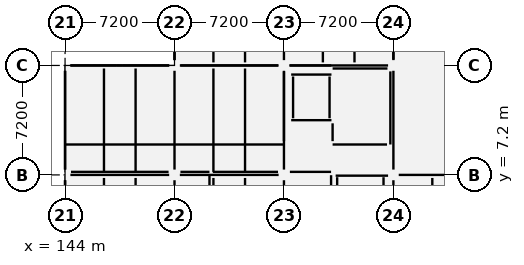
"""IFC4 building model, lengths in metres.
Left out: names, types, materials, properties, quantities, classifications, styles, units other than length and angle.
Written with IfcOpenShell. Run it as: python <this file> out.ifc"""

import sys

from ifc_helpers import new_model, si_unit, direction, frame, frame_2d, origin, origin_2d, place, context, subcontext, project, spatial, rectangle, extrude, element, fill, save


model = new_model("IFC4")
c1 = context("Model", 3, precision=1e-05, world=origin(), true_north=direction((0.0, 1.0)))
c2 = subcontext(c1, "Body", "Model", "MODEL_VIEW")
j1 = project(units=[si_unit("LENGTHUNIT", "METRE"), si_unit("PLANEANGLEUNIT", "RADIAN")], contexts=[c1])
p1 = place(None, origin())
s1 = spatial("IfcSite", under=j1, at=p1, CompositionType="ELEMENT")
p2 = place(p1, origin())
s2 = spatial("IfcBuilding", under=s1, at=p2, CompositionType="ELEMENT")
p3 = place(p2, frame((0.0, 0.0, 9.6)))
s3 = spatial("IfcBuildingStorey", under=s2, at=p3, CompositionType="ELEMENT", Elevation=9.6)
for number, where, z_axis, x_axis in (
    (1, (144.0, 7.2, 0.0), (0.0, 0.0, 1.0), (1.0, 0.0, 0.0)),
    (2, (144.0, 14.4, 0.0), (0.0, 0.0, 1.0), (1.0, 0.0, 0.0)),
    (3, (151.2, 7.2, 0.0), (0.0, 0.0, 1.0), (1.0, 0.0, 0.0)),
    (4, (151.2, 14.4, 0.0), (0.0, 0.0, 1.0), (1.0, 0.0, 0.0)),
    (5, (158.4, 7.2, 0.0), (0.0, 0.0, 1.0), (1.0, 0.0, 0.0)),
    (6, (158.4, 14.4, 0.0), (0.0, 0.0, 1.0), (1.0, 0.0, 0.0)),
    (7, (165.6, 7.2, 0.0), (0.0, 0.0, 1.0), (1.0, 0.0, 0.0)),
    (8, (165.6, 14.4, 0.0), (0.0, 0.0, 1.0), (1.0, 0.0, 0.0)),
):
    element("IfcColumn", number, at=place(p3, frame(where, z_axis=z_axis, x_axis=x_axis)), inside=s3, PredefinedType="COLUMN", context=c2, shape_type="SweptSolid", body=[
        extrude(rectangle(XDim=0.7, YDim=0.7, at=origin_2d()), origin(), (0.0, 0.0, 1.0), 3.9),
    ])
for number, where, z_axis, x_axis in (
    (9, (158.875, 10.8, 0.0), (0.0, 0.0, 1.0), (1.0, 0.0, 0.0)),
    (10, (158.875, 13.8, 0.0), (0.0, 0.0, 1.0), (1.0, 0.0, 0.0)),
):
    element("IfcWall", number, at=place(p3, frame(where, z_axis=z_axis, x_axis=x_axis)), inside=s3, PredefinedType="SHEAR", context=c2, shape_type="SweptSolid", body=[
        extrude(rectangle(XDim=2.65, YDim=0.25, at=frame_2d((1.325, 0.0))), origin(), (0.0, 0.0, 1.0), 3.65),
    ])
p4 = place(p3, frame((159.0, 10.925, 0.0), z_axis=(0.0, 0.0, 1.0), x_axis=(0.0, 1.0, 0.0)))
e11 = element("IfcWall", 11, at=p4, inside=s3, PredefinedType="SHEAR", context=c2, shape_type="SweptSolid", body=[
    extrude(rectangle(XDim=2.75, YDim=0.25, at=frame_2d((1.375, 0.0))), origin(), (0.0, 0.0, 1.0), 3.65),
])
p5 = place(p3, frame((161.4, 10.925, 0.0), z_axis=(0.0, 0.0, 1.0), x_axis=(0.0, 1.0, 0.0)))
e12 = element("IfcWall", 12, at=p5, inside=s3, PredefinedType="SHEAR", context=c2, shape_type="SweptSolid", body=[
    extrude(rectangle(XDim=2.75, YDim=0.25, at=frame_2d((1.375, 0.0))), origin(), (0.0, 0.0, 1.0), 3.65),
])
p6 = place(p5, frame((0.825, 0.0, 0.0)))
e13 = element("IfcOpeningElement", 13, at=p6, cuts=e12, PredefinedType="OPENING", context=c2, shape_type="SweptSolid", body=[
    extrude(rectangle(XDim=1.1, YDim=2.15, at=frame_2d((0.55, 1.075))), frame((0.0, 0.137, 0.0), z_axis=(0.0, -1.0, 0.0), x_axis=(1.0, 0.0, 0.0)), (0.0, 0.0, 1.0), 0.274),
])
p7 = place(p3, frame((161.8, 7.15, 0.0), z_axis=(0.0, 0.0, 1.0), x_axis=(1.0, 0.0, 0.0)))
e14 = element("IfcWall", 14, at=p7, inside=s3, PredefinedType="SHEAR", context=c2, shape_type="SweptSolid", body=[
    extrude(rectangle(XDim=3.45, YDim=0.2, at=frame_2d((1.725, 0.0))), origin(), (0.0, 0.0, 1.0), 3.65),
])
p8 = place(p7, frame((1.175, 0.0, 0.0)))
e15 = element("IfcOpeningElement", 15, at=p8, cuts=e14, PredefinedType="OPENING", context=c2, shape_type="SweptSolid", body=[
    extrude(rectangle(XDim=1.1, YDim=2.15, at=frame_2d((0.55, 1.075))), frame((0.0, 0.112, 0.0), z_axis=(0.0, -1.0, 0.0), x_axis=(1.0, 0.0, 0.0)), (0.0, 0.0, 1.0), 0.224),
])
for number, where, z_axis, x_axis in (
    (16, (161.9, 0.43, 0.0), (0.0, 0.0, 1.0), (0.0, 1.0, 0.0)),
    (17, (164.95, 0.43, 0.0), (0.0, 0.0, 1.0), (0.0, 1.0, 0.0)),
):
    element("IfcWall", number, at=place(p3, frame(where, z_axis=z_axis, x_axis=x_axis)), inside=s3, PredefinedType="SHEAR", context=c2, shape_type="SweptSolid", body=[
        extrude(rectangle(XDim=6.62, YDim=0.2, at=frame_2d((3.31, 0.0))), origin(), (0.0, 0.0, 1.0), 3.65),
    ])
p9 = place(p3, frame((144.0, 10.6, 0.0), z_axis=(0.0, 0.0, 1.0), x_axis=(0.0, 1.0, 0.0)))
e18 = element("IfcWall", 18, at=p9, inside=s3, PredefinedType="SOLIDWALL", context=c2, shape_type="SweptSolid", body=[
    extrude(rectangle(XDim=0.4, YDim=0.36, at=frame_2d((0.2, 0.0))), origin(), (0.0, 0.0, 1.0), 3.05),
])
p10 = place(p3, frame((147.4, 14.4, 0.0), z_axis=(0.0, 0.0, 1.0), x_axis=(1.0, 0.0, 0.0)))
e19 = element("IfcWall", 19, at=p10, inside=s3, PredefinedType="SOLIDWALL", context=c2, shape_type="SweptSolid", body=[
    extrude(rectangle(XDim=0.4, YDim=0.36, at=frame_2d((0.2, 0.0))), origin(), (0.0, 0.0, 1.0), 2.95),
])
p11 = place(p3, frame((165.4, 9.2, 0.0), z_axis=(0.0, 0.0, 1.0), x_axis=(0.0, 1.0, 0.0)))
e20 = element("IfcWall", 20, at=p11, inside=s3, PredefinedType="STANDARD", context=c2, shape_type="SweptSolid", body=[
    extrude(rectangle(XDim=4.81, YDim=0.22, at=frame_2d((2.405, 0.0))), origin(), (0.0, 0.0, 1.0), 3.038),
])
p12 = place(p11, frame((1.805, 0.0, 0.0)))
e21 = element("IfcOpeningElement", 21, at=p12, cuts=e20, PredefinedType="OPENING", context=c2, shape_type="SweptSolid", body=[
    extrude(rectangle(XDim=1.2, YDim=2.2, at=frame_2d((0.6, 1.1))), frame((0.0, 0.122, 0.0), z_axis=(0.0, -1.0, 0.0), x_axis=(1.0, 0.0, 0.0)), (0.0, 0.0, 1.0), 0.244),
])
p13 = place(p3, frame((161.6, 9.2, 0.0), z_axis=(0.0, 0.0, 1.0), x_axis=(1.0, 0.0, 0.0)))
e22 = element("IfcWall", 22, at=p13, inside=s3, PredefinedType="STANDARD", context=c2, shape_type="SweptSolid", body=[
    extrude(rectangle(XDim=3.58, YDim=0.22, at=frame_2d((1.79, 0.0))), origin(), (0.0, 0.0, 1.0), 3.62),
])
p14 = place(p3, frame((161.6, 14.2, 0.0), z_axis=(0.0, 0.0, 1.0), x_axis=(1.0, 0.0, 0.0)))
e23 = element("IfcWall", 23, at=p14, inside=s3, PredefinedType="STANDARD", context=c2, shape_type="SweptSolid", body=[
    extrude(rectangle(XDim=3.61, YDim=0.22, at=frame_2d((1.805, 0.0))), origin(), (0.0, 0.0, 1.0), 2.938),
])
p15 = place(p3, frame((161.6, 9.42, 0.0), z_axis=(0.0, 0.0, 1.0), x_axis=(0.0, 1.0, 0.0)))
e24 = element("IfcWall", 24, at=p15, inside=s3, PredefinedType="STANDARD", context=c2, shape_type="SweptSolid", body=[
    extrude(rectangle(XDim=1.174, YDim=0.22, at=frame_2d((0.587, 0.0))), origin(), (0.0, 0.0, 1.0), 3.62),
])
p16 = place(p3, frame((144.39, 7.4, 0.0), z_axis=(0.0, 0.0, 1.0), x_axis=(1.0, 0.0, 0.0)))
e25 = element("IfcWall", 25, at=p16, inside=s3, PredefinedType="PARTITIONING", context=c2, shape_type="SweptSolid", body=[
    extrude(rectangle(XDim=6.42, YDim=0.12, at=frame_2d((3.21, 0.0))), origin(), (0.0, 0.0, 1.0), 2.898),
])
p17 = place(p16, frame((2.71, 0.0, 0.0)))
e26 = element("IfcOpeningElement", 26, at=p17, cuts=e25, PredefinedType="OPENING", context=c2, shape_type="SweptSolid", body=[
    extrude(rectangle(XDim=1.0, YDim=2.15, at=frame_2d((0.5, 1.075))), frame((0.0, 0.072, 0.0), z_axis=(0.0, -1.0, 0.0), x_axis=(1.0, 0.0, 0.0)), (0.0, 0.0, 1.0), 0.144),
])
p18 = place(p3, frame((151.59, 7.4, 0.0), z_axis=(0.0, 0.0, 1.0), x_axis=(1.0, 0.0, 0.0)))
e27 = element("IfcWall", 27, at=p18, inside=s3, PredefinedType="PARTITIONING", context=c2, shape_type="SweptSolid", body=[
    extrude(rectangle(XDim=1.91, YDim=0.12, at=frame_2d((0.955, 0.0))), origin(), (0.0, 0.0, 1.0), 2.938),
])
p19 = place(p3, frame((153.5, 0.0, 0.0), z_axis=(0.0, 0.0, 1.0), x_axis=(0.0, 1.0, 0.0)))
e28 = element("IfcWall", 28, at=p19, inside=s3, PredefinedType="PARTITIONING", context=c2, shape_type="SweptSolid", body=[
    extrude(rectangle(XDim=7.18, YDim=0.12, at=frame_2d((3.59, 0.0))), origin(), (0.0, 0.0, 1.0), 2.938),
])
p20 = place(p3, frame((153.72, 7.4, 0.0), z_axis=(0.0, 0.0, 1.0), x_axis=(1.0, 0.0, 0.0)))
e29 = element("IfcWall", 29, at=p20, inside=s3, PredefinedType="STANDARD", context=c2, shape_type="SweptSolid", body=[
    extrude(rectangle(XDim=4.29, YDim=0.15, at=frame_2d((2.145, 0.0))), origin(), (0.0, 0.0, 1.0), 2.938),
])
p21 = place(p20, frame((1.62, 0.0, 0.0)))
e30 = element("IfcOpeningElement", 30, at=p21, cuts=e29, PredefinedType="OPENING", context=c2, shape_type="SweptSolid", body=[
    extrude(rectangle(XDim=1.05, YDim=2.15, at=frame_2d((0.525, 1.075))), frame((0.0, 0.087, 0.0), z_axis=(0.0, -1.0, 0.0), x_axis=(1.0, 0.0, 0.0)), (0.0, 0.0, 1.0), 0.174),
])
p22 = place(p3, frame((158.79, 7.4, 0.0), z_axis=(0.0, 0.0, 1.0), x_axis=(1.0, 0.0, 0.0)))
e31 = element("IfcWall", 31, at=p22, inside=s3, PredefinedType="STANDARD", context=c2, shape_type="SweptSolid", body=[
    extrude(rectangle(XDim=2.71, YDim=0.15, at=frame_2d((1.355, 0.0))), origin(), (0.0, 0.0, 1.0), 3.62),
])
p23 = place(p3, frame((161.5, 0.0, 0.0), z_axis=(0.0, 0.0, 1.0), x_axis=(0.0, 1.0, 0.0)))
e32 = element("IfcWall", 32, at=p23, inside=s3, PredefinedType="STANDARD", context=c2, shape_type="SweptSolid", body=[
    extrude(rectangle(XDim=7.18, YDim=0.15, at=frame_2d((3.59, 0.0))), origin(), (0.0, 0.0, 1.0), 2.988),
])
p24 = place(p3, frame((144.0, 9.2, 0.0), z_axis=(0.0, 0.0, 1.0), x_axis=(1.0, 0.0, 0.0)))
e33 = element("IfcWall", 33, at=p24, inside=s3, PredefinedType="PARTITIONING", context=c2, shape_type="SweptSolid", body=[
    extrude(rectangle(XDim=14.4, YDim=0.12, at=frame_2d((7.2, 0.0))), origin(), (0.0, 0.0, 1.0), 3.038),
])
p25 = place(p24, frame((6.675, 0.0, 0.0)))
e34 = element("IfcOpeningElement", 34, at=p25, cuts=e33, PredefinedType="OPENING", context=c2, shape_type="SweptSolid", body=[
    extrude(rectangle(XDim=1.05, YDim=2.15, at=frame_2d((0.525, 1.075))), frame((0.0, 0.072, 0.0), z_axis=(0.0, -1.0, 0.0), x_axis=(1.0, 0.0, 0.0)), (0.0, 0.0, 1.0), 0.144),
])
p26 = place(p3, frame((158.4, 9.42, 0.0), z_axis=(0.0, 0.0, 1.0), x_axis=(0.0, 1.0, 0.0)))
e35 = element("IfcWall", 35, at=p26, inside=s3, PredefinedType="PARTITIONING", context=c2, shape_type="SweptSolid", body=[
    extrude(rectangle(XDim=4.59, YDim=0.12, at=frame_2d((2.295, 0.0))), origin(), (0.0, 0.0, 1.0), 3.038),
])
p27 = place(p3, frame((165.6, 14.79, 0.0), z_axis=(0.0, 0.0, 1.0), x_axis=(0.0, 1.0, 0.0)))
e36 = element("IfcWall", 36, at=p27, inside=s3, PredefinedType="PARTITIONING", context=c2, shape_type="SweptSolid", body=[
    extrude(rectangle(XDim=6.42, YDim=0.12, at=frame_2d((3.21, 0.0))), origin(), (0.0, 0.0, 1.0), 2.988),
])
p28 = place(p27, frame((2.71, 0.0, 0.0)))
e37 = element("IfcOpeningElement", 37, at=p28, cuts=e36, PredefinedType="OPENING", context=c2, shape_type="SweptSolid", body=[
    extrude(rectangle(XDim=1.0, YDim=2.15, at=frame_2d((0.5, 1.075))), frame((0.0, 0.072, 0.0), z_axis=(0.0, -1.0, 0.0), x_axis=(1.0, 0.0, 0.0)), (0.0, 0.0, 1.0), 0.144),
])
p29 = place(p3, frame((151.59, 14.4, 0.0), z_axis=(0.0, 0.0, 1.0), x_axis=(1.0, 0.0, 0.0)))
e38 = element("IfcWall", 38, at=p29, inside=s3, PredefinedType="PARTITIONING", context=c2, shape_type="SweptSolid", body=[
    extrude(rectangle(XDim=6.42, YDim=0.12, at=frame_2d((3.21, 0.0))), origin(), (0.0, 0.0, 1.0), 2.888),
])
p30 = place(p3, frame((158.79, 14.4, 0.0), z_axis=(0.0, 0.0, 1.0), x_axis=(1.0, 0.0, 0.0)))
e39 = element("IfcWall", 39, at=p30, inside=s3, PredefinedType="PARTITIONING", context=c2, shape_type="SweptSolid", body=[
    extrude(rectangle(XDim=2.719, YDim=0.12, at=frame_2d((1.359, 0.0))), origin(), (0.0, 0.0, 1.0), 2.938),
])
p31 = place(p8, frame((1.1, 0.0, 0.0), z_axis=(0.0, 0.0, 1.0), x_axis=(-1.0, 0.0, 0.0)))
e40 = element("IfcDoor", 40, at=p31, inside=s3, OperationType="SINGLE_SWING_LEFT", PredefinedType="DOOR", context=c2, shape_type="SweptSolid", body=[
    extrude(rectangle(XDim=1.1, YDim=2.15, at=frame_2d((0.55, 1.075))), frame((0.0, 0.025, 0.0), z_axis=(0.0, -1.0, 0.0), x_axis=(1.0, 0.0, 0.0)), (0.0, 0.0, 1.0), 0.05),
])
fill(e15, e40)
p32 = place(p6, origin())
e41 = element("IfcDoor", 41, at=p32, inside=s3, OperationType="SLIDING_TO_LEFT", PredefinedType="DOOR", context=c2, shape_type="SweptSolid", body=[
    extrude(rectangle(XDim=1.1, YDim=2.15, at=frame_2d((0.55, 1.075))), frame((0.0, 0.025, 0.0), z_axis=(0.0, -1.0, 0.0), x_axis=(1.0, 0.0, 0.0)), (0.0, 0.0, 1.0), 0.05),
])
fill(e13, e41)
p33 = place(p12, origin())
e42 = element("IfcDoor", 42, at=p33, inside=s3, OperationType="SINGLE_SWING_LEFT", PredefinedType="DOOR", context=c2, shape_type="SweptSolid", body=[
    extrude(rectangle(XDim=1.2, YDim=2.2, at=frame_2d((0.6, 1.1))), frame((0.0, 0.025, 0.0), z_axis=(0.0, -1.0, 0.0), x_axis=(1.0, 0.0, 0.0)), (0.0, 0.0, 1.0), 0.05),
])
fill(e21, e42)
p34 = place(p17, origin())
e43 = element("IfcDoor", 43, at=p34, inside=s3, OperationType="SINGLE_SWING_RIGHT", PredefinedType="DOOR", context=c2, shape_type="SweptSolid", body=[
    extrude(rectangle(XDim=1.0, YDim=2.15, at=frame_2d((0.5, 1.075))), frame((0.0, 0.025, 0.0), z_axis=(0.0, -1.0, 0.0), x_axis=(1.0, 0.0, 0.0)), (0.0, 0.0, 1.0), 0.05),
])
fill(e26, e43)
p35 = place(p21, origin())
e44 = element("IfcDoor", 44, at=p35, inside=s3, OperationType="SINGLE_SWING_LEFT", PredefinedType="DOOR", context=c2, shape_type="SweptSolid", body=[
    extrude(rectangle(XDim=1.05, YDim=2.15, at=frame_2d((0.525, 1.075))), frame((0.0, 0.025, 0.0), z_axis=(0.0, -1.0, 0.0), x_axis=(1.0, 0.0, 0.0)), (0.0, 0.0, 1.0), 0.05),
])
fill(e30, e44)
p36 = place(p25, origin())
e45 = element("IfcDoor", 45, at=p36, inside=s3, OperationType="SINGLE_SWING_RIGHT", PredefinedType="DOOR", context=c2, shape_type="SweptSolid", body=[
    extrude(rectangle(XDim=1.05, YDim=2.15, at=frame_2d((0.525, 1.075))), frame((0.0, 0.025, 0.0), z_axis=(0.0, -1.0, 0.0), x_axis=(1.0, 0.0, 0.0)), (0.0, 0.0, 1.0), 0.05),
])
fill(e34, e45)
save(model, sys.argv[1])
